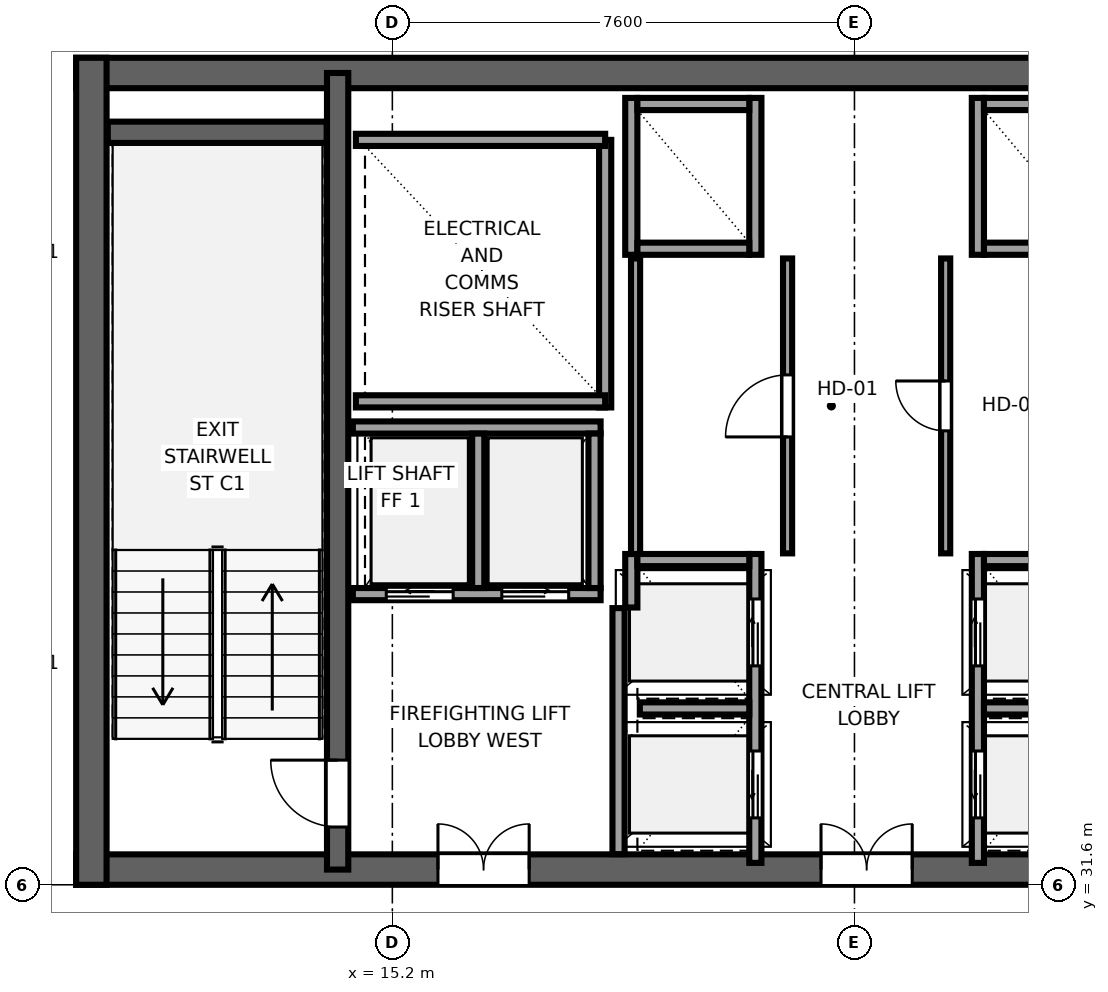
"""IFC4 building model, lengths in metres.
Left out: names, types, materials, properties, quantities, classifications, styles, units other than length and angle.
Written with IfcOpenShell. Run it as: python <this file> out.ifc"""

import sys

from ifc_helpers import new_model, si_unit, direction, frame, frame_2d, origin, place, context, subcontext, project, spatial, rectangle, extrude, source, transform, mapped, element, fill, save


model = new_model("IFC4")
c1 = context("Model", 3, precision=1e-05, world=origin(), true_north=direction((0.0, 1.0)))
c2 = subcontext(c1, "Body", "Model", "MODEL_VIEW")
j1 = project(units=[si_unit("LENGTHUNIT", "METRE"), si_unit("PLANEANGLEUNIT", "RADIAN")], contexts=[c1])
p1 = place(None, origin())
s1 = spatial("IfcSite", under=j1, at=p1, CompositionType="ELEMENT")
p2 = place(p1, origin())
s2 = spatial("IfcBuilding", under=s1, at=p2, CompositionType="ELEMENT")
p3 = place(p2, frame((0.0, 0.0, 216.8)))
s3 = spatial("IfcBuildingStorey", under=s2, at=p3, CompositionType="ELEMENT", Elevation=216.8)
p4 = place(p3, frame((10.0, 31.85, 0.0), z_axis=(0.0, 0.0, 1.0), x_axis=(1.0, 0.0, 0.0)))
e1 = element("IfcWall", 1, at=p4, inside=s3, PredefinedType="SHEAR", context=c2, shape_type="SweptSolid", body=[
    extrude(rectangle(XDim=26.0, YDim=0.5, at=frame_2d((13.0, 0.0))), origin(), (0.0, 0.0, 1.0), 3.55),
])
p5 = place(p4, frame((7.45, 0.0, 0.0), z_axis=(0.0, 0.0, 1.0), x_axis=(-1.0, 0.0, 0.0)))
e2 = element("IfcOpeningElement", 2, at=p5, cuts=e1, PredefinedType="OPENING", context=c2, shape_type="SweptSolid", body=[
    extrude(rectangle(XDim=1.5, YDim=2.04, at=frame_2d((0.75, 1.02))), frame((0.0, 0.26, 0.0), z_axis=(0.0, -1.0, 0.0), x_axis=(1.0, 0.0, 0.0)), (0.0, 0.0, 1.0), 0.52),
])
p6 = place(p4, frame((13.75, 0.0, 0.0), z_axis=(0.0, 0.0, 1.0), x_axis=(-1.0, 0.0, 0.0)))
e3 = element("IfcOpeningElement", 3, at=p6, cuts=e1, PredefinedType="OPENING", context=c2, shape_type="SweptSolid", body=[
    extrude(rectangle(XDim=1.5, YDim=2.04, at=frame_2d((0.75, 1.02))), frame((0.0, 0.26, 0.0), z_axis=(0.0, -1.0, 0.0), x_axis=(1.0, 0.0, 0.0)), (0.0, 0.0, 1.0), 0.52),
])
p7 = place(p4, frame((20.05, 0.0, 0.0), z_axis=(0.0, 0.0, 1.0), x_axis=(-1.0, 0.0, 0.0)))
e4 = element("IfcOpeningElement", 4, at=p7, cuts=e1, PredefinedType="OPENING", context=c2, shape_type="SweptSolid", body=[
    extrude(rectangle(XDim=1.5, YDim=2.04, at=frame_2d((0.75, 1.02))), frame((0.0, 0.26, 0.0), z_axis=(0.0, -1.0, 0.0), x_axis=(1.0, 0.0, 0.0)), (0.0, 0.0, 1.0), 0.52),
])
p8 = place(p3, frame((10.0, 44.95, 0.0), z_axis=(0.0, 0.0, 1.0), x_axis=(1.0, 0.0, 0.0)))
e5 = element("IfcWall", 5, at=p8, inside=s3, PredefinedType="SHEAR", context=c2, shape_type="SweptSolid", body=[
    extrude(rectangle(XDim=26.0, YDim=0.5, at=frame_2d((13.0, 0.0))), origin(), (0.0, 0.0, 1.0), 3.55),
])
p9 = place(p3, frame((10.25, 31.6, 0.0), z_axis=(0.0, 0.0, 1.0), x_axis=(0.0, 1.0, 0.0)))
e6 = element("IfcWall", 6, at=p9, inside=s3, PredefinedType="SHEAR", context=c2, shape_type="SweptSolid", body=[
    extrude(rectangle(XDim=13.6, YDim=0.5, at=frame_2d((6.8, 0.0))), origin(), (0.0, 0.0, 1.0), 3.55),
])
p10 = place(p3, frame((14.3, 31.85, 0.0), z_axis=(0.0, 0.0, 1.0), x_axis=(0.0, 1.0, 0.0)))
e7 = element("IfcWall", 7, at=p10, inside=s3, PredefinedType="SHEAR", context=c2, shape_type="SweptSolid", body=[
    extrude(rectangle(XDim=13.1, YDim=0.35, at=frame_2d((6.55, 0.0))), origin(), (0.0, 0.0, 1.0), 3.55),
])
p11 = place(p10, frame((0.7, 0.0, 0.0)))
e8 = element("IfcOpeningElement", 8, at=p11, cuts=e7, PredefinedType="OPENING", context=c2, shape_type="SweptSolid", body=[
    extrude(rectangle(XDim=1.1, YDim=2.12, at=frame_2d((0.55, 1.06))), frame((0.0, 0.185, 0.0), z_axis=(0.0, -1.0, 0.0), x_axis=(1.0, 0.0, 0.0)), (0.0, 0.0, 1.0), 0.37),
])
p12 = place(p3, frame((10.52, 43.975, 0.0), z_axis=(0.0, 0.0, 1.0), x_axis=(1.0, 0.0, 0.0)))
e9 = element("IfcWall", 9, at=p12, inside=s3, PredefinedType="SHEAR", context=c2, shape_type="SweptSolid", body=[
    extrude(rectangle(XDim=3.6, YDim=0.35, at=frame_2d((1.8, 0.0))), origin(), (0.0, 0.0, 1.0), 3.55),
])
p13 = place(p3, frame((18.7, 39.45, 0.0), z_axis=(0.0, 0.0, 1.0), x_axis=(0.0, 1.0, 0.0)))
e10 = element("IfcWall", 10, at=p13, inside=s3, PredefinedType="SOLIDWALL", context=c2, shape_type="SweptSolid", body=[
    extrude(rectangle(XDim=4.4, YDim=0.2, at=frame_2d((2.2, 0.0))), origin(), (0.0, 0.0, 1.0), 3.37),
])
for number, where, z_axis, x_axis in (
    (11, (14.6, 39.55, 0.0), (0.0, 0.0, 1.0), (1.0, 0.0, 0.0)),
    (12, (14.6, 43.85, 0.0), (0.0, 0.0, 1.0), (1.0, 0.0, 0.0)),
):
    element("IfcWall", number, at=place(p3, frame(where, z_axis=z_axis, x_axis=x_axis)), inside=s3, PredefinedType="SOLIDWALL", context=c2, shape_type="SweptSolid", body=[
        extrude(rectangle(XDim=4.1, YDim=0.2, at=frame_2d((2.05, 0.0))), origin(), (0.0, 0.0, 1.0), 3.37),
    ])
p14 = place(p3, frame((18.92, 32.104, 0.0), z_axis=(0.0, 0.0, 1.0), x_axis=(0.0, 1.0, 0.0)))
e13 = element("IfcWall", 13, at=p14, inside=s3, PredefinedType="SOLIDWALL", context=c2, shape_type="SweptSolid", body=[
    extrude(rectangle(XDim=4.046, YDim=0.2, at=frame_2d((2.023, 0.0))), origin(), (0.0, 0.0, 1.0), 3.37),
])
p15 = place(p3, frame((21.17, 31.96, 0.0), z_axis=(0.0, 0.0, 1.0), x_axis=(0.0, 1.0, 0.0)))
e14 = element("IfcWall", 14, at=p15, inside=s3, PredefinedType="SOLIDWALL", context=c2, shape_type="SweptSolid", body=[
    extrude(rectangle(XDim=5.08, YDim=0.2, at=frame_2d((2.54, 0.0))), origin(), (0.0, 0.0, 1.0), 3.37),
])
p16 = place(p15, frame((0.74, 0.0, 0.0)))
e15 = element("IfcOpeningElement", 15, at=p16, cuts=e14, PredefinedType="OPENING", context=c2, shape_type="SweptSolid", body=[
    extrude(rectangle(XDim=1.1, YDim=2.12, at=frame_2d((0.55, 1.06))), frame((0.0, 0.11, 0.0), z_axis=(0.0, -1.0, 0.0), x_axis=(1.0, 0.0, 0.0)), (0.0, 0.0, 1.0), 0.22),
])
p17 = place(p15, frame((3.24, 0.0, 0.0)))
e16 = element("IfcOpeningElement", 16, at=p17, cuts=e14, PredefinedType="OPENING", context=c2, shape_type="SweptSolid", body=[
    extrude(rectangle(XDim=1.1, YDim=2.12, at=frame_2d((0.55, 1.06))), frame((0.0, 0.11, 0.0), z_axis=(0.0, -1.0, 0.0), x_axis=(1.0, 0.0, 0.0)), (0.0, 0.0, 1.0), 0.22),
])
p18 = place(p3, frame((19.13, 36.16, 0.0), z_axis=(0.0, 0.0, 1.0), x_axis=(0.0, 1.0, 0.0)))
e17 = element("IfcWall", 17, at=p18, inside=s3, PredefinedType="SOLIDWALL", context=c2, shape_type="SweptSolid", body=[
    extrude(rectangle(XDim=0.88, YDim=0.2, at=frame_2d((0.44, 0.0))), origin(), (0.0, 0.0, 1.0), 3.37),
])
p19 = place(p3, frame((19.23, 36.94, 0.0), z_axis=(0.0, 0.0, 1.0), x_axis=(1.0, 0.0, 0.0)))
e18 = element("IfcWall", 18, at=p19, inside=s3, PredefinedType="SOLIDWALL", context=c2, shape_type="SweptSolid", body=[
    extrude(rectangle(XDim=1.84, YDim=0.2, at=frame_2d((0.92, 0.0))), origin(), (0.0, 0.0, 1.0), 3.37),
])
p20 = place(p3, frame((19.27, 34.5, 0.0), z_axis=(0.0, 0.0, 1.0), x_axis=(1.0, 0.0, 0.0)))
e19 = element("IfcWall", 19, at=p20, inside=s3, PredefinedType="SOLIDWALL", context=c2, shape_type="SweptSolid", body=[
    extrude(rectangle(XDim=1.8, YDim=0.2, at=frame_2d((0.9, 0.0))), origin(), (0.0, 0.0, 1.0), 3.37),
])
for number, where, z_axis, x_axis in (
    (20, (21.17, 41.96, 0.0), (0.0, 0.0, 1.0), (0.0, 1.0, 0.0)),
    (21, (19.13, 41.96, 0.0), (0.0, 0.0, 1.0), (0.0, 1.0, 0.0)),
):
    element("IfcWall", number, at=place(p3, frame(where, z_axis=z_axis, x_axis=x_axis)), inside=s3, PredefinedType="SOLIDWALL", context=c2, shape_type="SweptSolid", body=[
        extrude(rectangle(XDim=2.58, YDim=0.2, at=frame_2d((1.29, 0.0))), origin(), (0.0, 0.0, 1.0), 3.37),
    ])
for number, where, z_axis, x_axis in (
    (22, (19.23, 42.06, 0.0), (0.0, 0.0, 1.0), (1.0, 0.0, 0.0)),
    (23, (19.23, 44.44, 0.0), (0.0, 0.0, 1.0), (1.0, 0.0, 0.0)),
):
    element("IfcWall", number, at=place(p3, frame(where, z_axis=z_axis, x_axis=x_axis)), inside=s3, PredefinedType="SOLIDWALL", context=c2, shape_type="SweptSolid", body=[
        extrude(rectangle(XDim=1.84, YDim=0.2, at=frame_2d((0.92, 0.0))), origin(), (0.0, 0.0, 1.0), 3.37),
    ])
p21 = place(p3, frame((14.55, 36.38, 0.0), z_axis=(0.0, 0.0, 1.0), x_axis=(1.0, 0.0, 0.0)))
e24 = element("IfcWall", 24, at=p21, inside=s3, PredefinedType="SOLIDWALL", context=c2, shape_type="SweptSolid", body=[
    extrude(rectangle(XDim=4.075, YDim=0.2, at=frame_2d((2.038, 0.0))), origin(), (0.0, 0.0, 1.0), 3.37),
])
p22 = place(p21, frame((0.55, 0.0, 0.0)))
e25 = element("IfcOpeningElement", 25, at=p22, cuts=e24, PredefinedType="OPENING", context=c2, shape_type="SweptSolid", body=[
    extrude(rectangle(XDim=1.1, YDim=2.12, at=frame_2d((0.55, 1.06))), frame((0.0, 0.11, 0.0), z_axis=(0.0, -1.0, 0.0), x_axis=(1.0, 0.0, 0.0)), (0.0, 0.0, 1.0), 0.22),
])
p23 = place(p21, frame((2.45, 0.0, 0.0)))
e26 = element("IfcOpeningElement", 26, at=p23, cuts=e24, PredefinedType="OPENING", context=c2, shape_type="SweptSolid", body=[
    extrude(rectangle(XDim=1.1, YDim=2.12, at=frame_2d((0.55, 1.06))), frame((0.0, 0.11, 0.0), z_axis=(0.0, -1.0, 0.0), x_axis=(1.0, 0.0, 0.0)), (0.0, 0.0, 1.0), 0.22),
])
p24 = place(p3, frame((14.55, 39.12, 0.0), z_axis=(0.0, 0.0, 1.0), x_axis=(1.0, 0.0, 0.0)))
e27 = element("IfcWall", 27, at=p24, inside=s3, PredefinedType="SOLIDWALL", context=c2, shape_type="SweptSolid", body=[
    extrude(rectangle(XDim=4.075, YDim=0.2, at=frame_2d((2.038, 0.0))), origin(), (0.0, 0.0, 1.0), 3.37),
])
for number, where, z_axis, x_axis in (
    (28, (18.525, 36.48, 0.0), (0.0, 0.0, 1.0), (0.0, 1.0, 0.0)),
    (29, (16.613, 36.48, 0.0), (0.0, 0.0, 1.0), (0.0, 1.0, 0.0)),
):
    element("IfcWall", number, at=place(p3, frame(where, z_axis=z_axis, x_axis=x_axis)), inside=s3, PredefinedType="SOLIDWALL", context=c2, shape_type="SweptSolid", body=[
        extrude(rectangle(XDim=2.54, YDim=0.2, at=frame_2d((1.27, 0.0))), origin(), (0.0, 0.0, 1.0), 3.37),
    ])
p25 = place(p3, frame((24.83, 31.96, 0.0), z_axis=(0.0, 0.0, 1.0), x_axis=(0.0, 1.0, 0.0)))
e30 = element("IfcWall", 30, at=p25, inside=s3, PredefinedType="SOLIDWALL", context=c2, shape_type="SweptSolid", body=[
    extrude(rectangle(XDim=5.08, YDim=0.2, at=frame_2d((2.54, 0.0))), origin(), (0.0, 0.0, 1.0), 3.37),
])
p26 = place(p25, frame((0.74, 0.0, 0.0)))
e31 = element("IfcOpeningElement", 31, at=p26, cuts=e30, PredefinedType="OPENING", context=c2, shape_type="SweptSolid", body=[
    extrude(rectangle(XDim=1.1, YDim=2.12, at=frame_2d((0.55, 1.06))), frame((0.0, 0.11, 0.0), z_axis=(0.0, -1.0, 0.0), x_axis=(1.0, 0.0, 0.0)), (0.0, 0.0, 1.0), 0.22),
])
p27 = place(p25, frame((3.24, 0.0, 0.0)))
e32 = element("IfcOpeningElement", 32, at=p27, cuts=e30, PredefinedType="OPENING", context=c2, shape_type="SweptSolid", body=[
    extrude(rectangle(XDim=1.1, YDim=2.12, at=frame_2d((0.55, 1.06))), frame((0.0, 0.11, 0.0), z_axis=(0.0, -1.0, 0.0), x_axis=(1.0, 0.0, 0.0)), (0.0, 0.0, 1.0), 0.22),
])
p28 = place(p3, frame((24.93, 36.94, 0.0), z_axis=(0.0, 0.0, 1.0), x_axis=(1.0, 0.0, 0.0)))
e33 = element("IfcWall", 33, at=p28, inside=s3, PredefinedType="SOLIDWALL", context=c2, shape_type="SweptSolid", body=[
    extrude(rectangle(XDim=1.84, YDim=0.2, at=frame_2d((0.92, 0.0))), origin(), (0.0, 0.0, 1.0), 3.37),
])
p29 = place(p3, frame((24.93, 34.5, 0.0), z_axis=(0.0, 0.0, 1.0), x_axis=(1.0, 0.0, 0.0)))
e34 = element("IfcWall", 34, at=p29, inside=s3, PredefinedType="SOLIDWALL", context=c2, shape_type="SweptSolid", body=[
    extrude(rectangle(XDim=1.8, YDim=0.2, at=frame_2d((0.9, 0.0))), origin(), (0.0, 0.0, 1.0), 3.37),
])
p30 = place(p3, frame((24.83, 41.96, 0.0), z_axis=(0.0, 0.0, 1.0), x_axis=(0.0, 1.0, 0.0)))
e35 = element("IfcWall", 35, at=p30, inside=s3, PredefinedType="SOLIDWALL", context=c2, shape_type="SweptSolid", body=[
    extrude(rectangle(XDim=2.58, YDim=0.2, at=frame_2d((1.29, 0.0))), origin(), (0.0, 0.0, 1.0), 3.37),
])
for number, where, z_axis, x_axis in (
    (36, (24.93, 42.06, 0.0), (0.0, 0.0, 1.0), (1.0, 0.0, 0.0)),
    (37, (24.93, 44.44, 0.0), (0.0, 0.0, 1.0), (1.0, 0.0, 0.0)),
):
    element("IfcWall", number, at=place(p3, frame(where, z_axis=z_axis, x_axis=x_axis)), inside=s3, PredefinedType="SOLIDWALL", context=c2, shape_type="SweptSolid", body=[
        extrude(rectangle(XDim=1.84, YDim=0.2, at=frame_2d((0.92, 0.0))), origin(), (0.0, 0.0, 1.0), 3.37),
    ])
p31 = place(p3, frame((21.7, 37.05, 0.0), z_axis=(0.0, 0.0, 1.0), x_axis=(0.0, 1.0, 0.0)))
e38 = element("IfcWall", 38, at=p31, inside=s3, PredefinedType="PARTITIONING", context=c2, shape_type="SweptSolid", body=[
    extrude(rectangle(XDim=4.85, YDim=0.15, at=frame_2d((2.425, 0.0))), origin(), (0.0, 0.0, 1.0), 3.37),
])
p32 = place(p31, frame((1.915, 0.0, 0.0)))
e39 = element("IfcOpeningElement", 39, at=p32, cuts=e38, PredefinedType="OPENING", context=c2, shape_type="SweptSolid", body=[
    extrude(rectangle(XDim=1.02, YDim=2.03, at=frame_2d((0.51, 1.015))), frame((0.0, 0.085, 0.0), z_axis=(0.0, -1.0, 0.0), x_axis=(1.0, 0.0, 0.0)), (0.0, 0.0, 1.0), 0.17),
])
p33 = place(p3, frame((19.2, 37.04, 0.0), z_axis=(0.0, 0.0, 1.0), x_axis=(0.0, 1.0, 0.0)))
e40 = element("IfcWall", 40, at=p33, inside=s3, PredefinedType="PARTITIONING", context=c2, shape_type="SweptSolid", body=[
    extrude(rectangle(XDim=4.86, YDim=0.15, at=frame_2d((2.43, 0.0))), origin(), (0.0, 0.0, 1.0), 3.37),
])
p34 = place(p3, frame((24.3, 37.05, 0.0), z_axis=(0.0, 0.0, 1.0), x_axis=(0.0, 1.0, 0.0)))
e41 = element("IfcWall", 41, at=p34, inside=s3, PredefinedType="PARTITIONING", context=c2, shape_type="SweptSolid", body=[
    extrude(rectangle(XDim=4.85, YDim=0.15, at=frame_2d((2.425, 0.0))), origin(), (0.0, 0.0, 1.0), 3.37),
])
p35 = place(p34, frame((2.015, 0.0, 0.0)))
e42 = element("IfcOpeningElement", 42, at=p35, cuts=e41, PredefinedType="OPENING", context=c2, shape_type="SweptSolid", body=[
    extrude(rectangle(XDim=0.82, YDim=2.01, at=frame_2d((0.41, 1.005))), frame((0.0, 0.085, 0.0), z_axis=(0.0, -1.0, 0.0), x_axis=(1.0, 0.0, 0.0)), (0.0, 0.0, 1.0), 0.17),
])
m1 = source(origin(), c2, "Body", "SweptSolid", [
    extrude(rectangle(XDim=1.1, YDim=2.12, at=frame_2d((0.55, 1.06))), frame((0.0, 0.025, 0.0), z_axis=(0.0, -1.0, 0.0), x_axis=(1.0, 0.0, 0.0)), (0.0, 0.0, 1.0), 0.05),
])
p36 = place(p11, origin())
e43 = element("IfcDoor", 43, at=p36, inside=s3, OperationType="SINGLE_SWING_RIGHT", PredefinedType="DOOR", context=c2, shape_type="MappedRepresentation", body=[
    mapped(m1, transform((0.0, 0.0, 0.0), x_axis=(1.0, 0.0, 0.0), y_axis=(0.0, 1.0, 0.0), z_axis=(0.0, 0.0, 1.0), scale=1.0)),
])
fill(e8, e43)
m2 = source(origin(), c2, "Body", "SweptSolid", [
    extrude(rectangle(XDim=1.5, YDim=2.04, at=frame_2d((0.75, 1.02))), frame((0.0, 0.025, 0.0), z_axis=(0.0, -1.0, 0.0), x_axis=(1.0, 0.0, 0.0)), (0.0, 0.0, 1.0), 0.05),
])
p37 = place(p5, origin())
e44 = element("IfcDoor", 44, at=p37, inside=s3, OperationType="DOUBLE_DOOR_SINGLE_SWING", PredefinedType="DOOR", context=c2, shape_type="MappedRepresentation", body=[
    mapped(m2, transform((0.0, 0.0, 0.0), x_axis=(1.0, 0.0, 0.0), y_axis=(0.0, 1.0, 0.0), z_axis=(0.0, 0.0, 1.0), scale=1.0)),
])
fill(e2, e44)
p38 = place(p6, origin())
e45 = element("IfcDoor", 45, at=p38, inside=s3, OperationType="DOUBLE_DOOR_SINGLE_SWING", PredefinedType="DOOR", context=c2, shape_type="MappedRepresentation", body=[
    mapped(m2, transform((0.0, 0.0, 0.0), x_axis=(1.0, 0.0, 0.0), y_axis=(0.0, 1.0, 0.0), z_axis=(0.0, 0.0, 1.0), scale=1.0)),
])
fill(e3, e45)
m3 = source(origin(), c2, "Body", "SweptSolid", [
    extrude(rectangle(XDim=1.1, YDim=2.12, at=frame_2d((0.55, 1.06))), frame((0.0, 0.025, 0.0), z_axis=(0.0, -1.0, 0.0), x_axis=(1.0, 0.0, 0.0)), (0.0, 0.0, 1.0), 0.05),
])
p39 = place(p16, origin())
e46 = element("IfcDoor", 46, at=p39, inside=s3, OperationType="SLIDING_TO_LEFT", PredefinedType="DOOR", context=c2, shape_type="MappedRepresentation", body=[
    mapped(m3, transform((0.0, 0.0, 0.0), x_axis=(1.0, 0.0, 0.0), y_axis=(0.0, 1.0, 0.0), z_axis=(0.0, 0.0, 1.0), scale=1.0)),
])
fill(e15, e46)
p40 = place(p17, origin())
e47 = element("IfcDoor", 47, at=p40, inside=s3, OperationType="SLIDING_TO_RIGHT", PredefinedType="DOOR", context=c2, shape_type="MappedRepresentation", body=[
    mapped(m3, transform((0.0, 0.0, 0.0), x_axis=(1.0, 0.0, 0.0), y_axis=(0.0, 1.0, 0.0), z_axis=(0.0, 0.0, 1.0), scale=1.0)),
])
fill(e16, e47)
p41 = place(p22, origin())
e48 = element("IfcDoor", 48, at=p41, inside=s3, OperationType="SLIDING_TO_LEFT", PredefinedType="DOOR", context=c2, shape_type="MappedRepresentation", body=[
    mapped(m3, transform((0.0, 0.0, 0.0), x_axis=(1.0, 0.0, 0.0), y_axis=(0.0, 1.0, 0.0), z_axis=(0.0, 0.0, 1.0), scale=1.0)),
])
fill(e25, e48)
p42 = place(p23, origin())
e49 = element("IfcDoor", 49, at=p42, inside=s3, OperationType="SLIDING_TO_RIGHT", PredefinedType="DOOR", context=c2, shape_type="MappedRepresentation", body=[
    mapped(m3, transform((0.0, 0.0, 0.0), x_axis=(1.0, 0.0, 0.0), y_axis=(0.0, 1.0, 0.0), z_axis=(0.0, 0.0, 1.0), scale=1.0)),
])
fill(e26, e49)
p43 = place(p26, origin())
e50 = element("IfcDoor", 50, at=p43, inside=s3, OperationType="SLIDING_TO_LEFT", PredefinedType="DOOR", context=c2, shape_type="MappedRepresentation", body=[
    mapped(m3, transform((0.0, 0.0, 0.0), x_axis=(1.0, 0.0, 0.0), y_axis=(0.0, 1.0, 0.0), z_axis=(0.0, 0.0, 1.0), scale=1.0)),
])
fill(e31, e50)
p44 = place(p27, origin())
e51 = element("IfcDoor", 51, at=p44, inside=s3, OperationType="SLIDING_TO_RIGHT", PredefinedType="DOOR", context=c2, shape_type="MappedRepresentation", body=[
    mapped(m3, transform((0.0, 0.0, 0.0), x_axis=(1.0, 0.0, 0.0), y_axis=(0.0, 1.0, 0.0), z_axis=(0.0, 0.0, 1.0), scale=1.0)),
])
fill(e32, e51)
m4 = source(origin(), c2, "Body", "SweptSolid", [
    extrude(rectangle(XDim=1.02, YDim=2.03, at=frame_2d((0.51, 1.015))), frame((0.0, 0.025, 0.0), z_axis=(0.0, -1.0, 0.0), x_axis=(1.0, 0.0, 0.0)), (0.0, 0.0, 1.0), 0.05),
])
p45 = place(p32, origin())
e52 = element("IfcDoor", 52, at=p45, inside=s3, OperationType="SINGLE_SWING_LEFT", PredefinedType="DOOR", context=c2, shape_type="MappedRepresentation", body=[
    mapped(m4, transform((0.0, 0.0, 0.0), x_axis=(1.0, 0.0, 0.0), y_axis=(0.0, 1.0, 0.0), z_axis=(0.0, 0.0, 1.0), scale=1.0)),
])
fill(e39, e52)
m5 = source(origin(), c2, "Body", "SweptSolid", [
    extrude(rectangle(XDim=0.82, YDim=2.01, at=frame_2d((0.41, 1.005))), frame((0.0, 0.025, 0.0), z_axis=(0.0, -1.0, 0.0), x_axis=(1.0, 0.0, 0.0)), (0.0, 0.0, 1.0), 0.05),
])
p46 = place(p35, origin())
e53 = element("IfcDoor", 53, at=p46, inside=s3, OperationType="SINGLE_SWING_RIGHT", PredefinedType="DOOR", context=c2, shape_type="MappedRepresentation", body=[
    mapped(m5, transform((0.0, 0.0, 0.0), x_axis=(1.0, 0.0, 0.0), y_axis=(0.0, 1.0, 0.0), z_axis=(0.0, 0.0, 1.0), scale=1.0)),
])
fill(e42, e53)
save(model, sys.argv[1])
